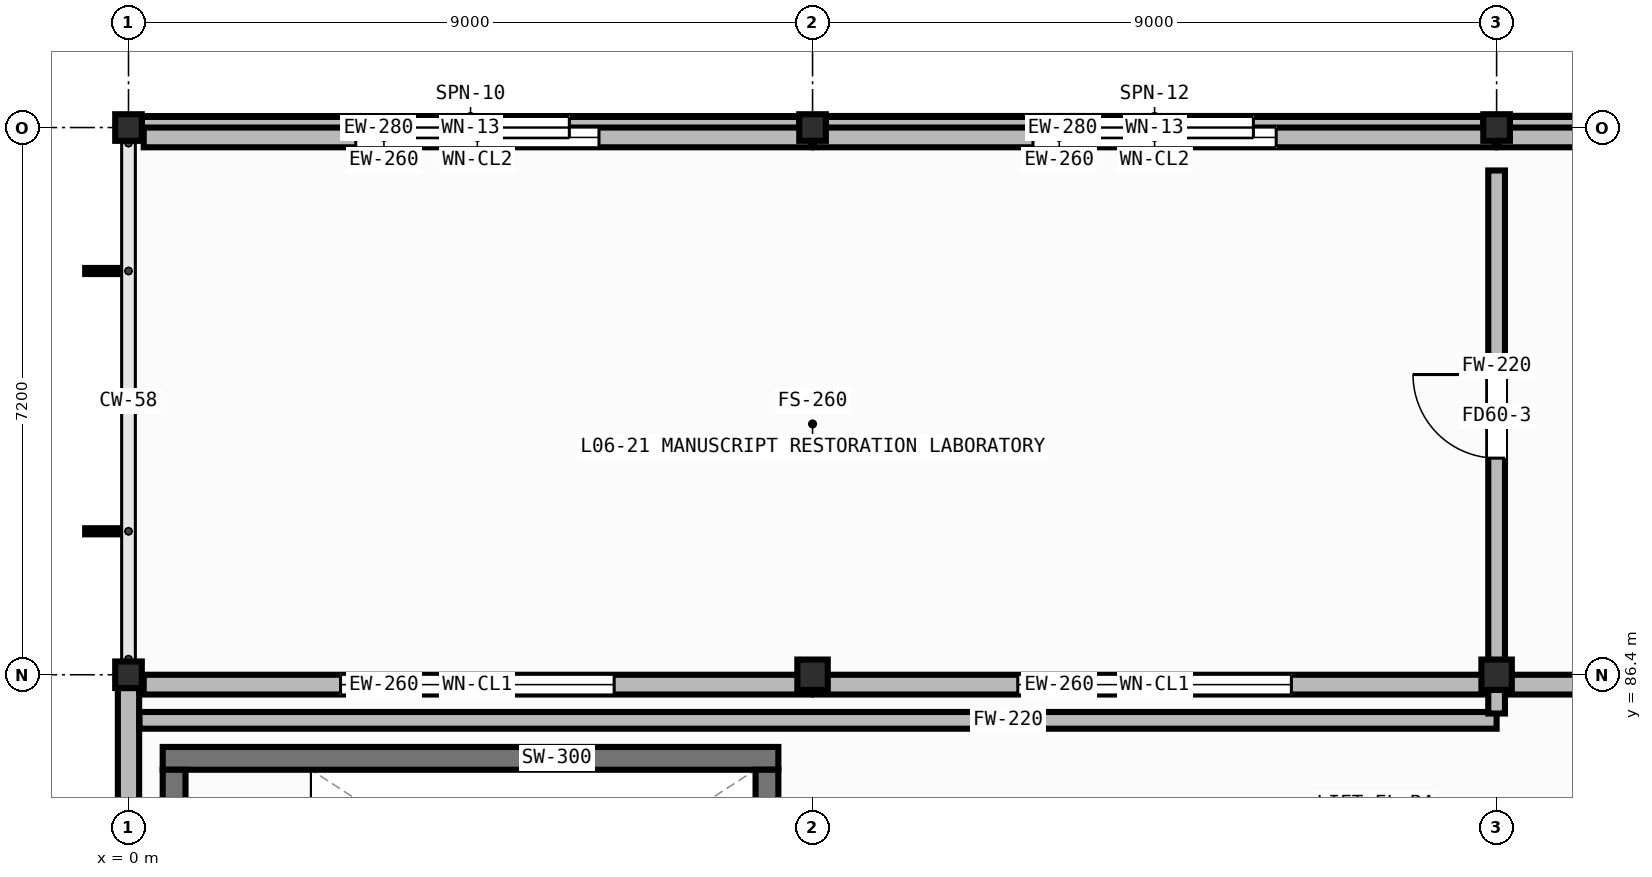
"""IFC4 building model, lengths in metres.
Left out: names, types, materials, properties, quantities, classifications, styles, units other than length and angle.
Written with IfcOpenShell. Run it as: python <this file> out.ifc"""

import sys

from ifc_helpers import new_model, si_unit, direction, frame, frame_2d, origin, origin_2d, place, context, subcontext, project, spatial, rectangle, hollow_rectangle, extrude, element, fill, save


model = new_model("IFC4")
c1 = context("Model", 3, precision=1e-05, world=origin(), true_north=direction((0.0, 1.0)))
c2 = subcontext(c1, "Body", "Model", "MODEL_VIEW")
j1 = project(units=[si_unit("LENGTHUNIT", "METRE"), si_unit("PLANEANGLEUNIT", "RADIAN")], contexts=[c1])
p1 = place(None, origin())
s1 = spatial("IfcSite", under=j1, at=p1, CompositionType="ELEMENT")
p2 = place(p1, origin())
s2 = spatial("IfcBuilding", under=s1, at=p2, CompositionType="ELEMENT")
p3 = place(p2, frame((0.0, 0.0, 20.6)))
s3 = spatial("IfcBuildingStorey", under=s2, at=p3, CompositionType="ELEMENT", Elevation=20.6)
for number, where, z_axis, x_axis in (
    (1, (0.0, 86.4, 0.0), (0.0, 0.0, 1.0), (1.0, 0.0, 0.0)),
    (2, (0.0, 93.6, 0.0), (0.0, 0.0, 1.0), (1.0, 0.0, 0.0)),
):
    element("IfcColumn", number, at=place(p3, frame(where, z_axis=z_axis, x_axis=x_axis)), inside=s3, PredefinedType="COLUMN", context=c2, shape_type="SweptSolid", body=[
        extrude(hollow_rectangle(XDim=0.35, YDim=0.35, WallThickness=0.012, at=origin_2d()), origin(), (0.0, 0.0, 1.0), 3.18),
    ])
p4 = place(p3, frame((9.0, 86.4, 0.0), z_axis=(0.0, 0.0, 1.0), x_axis=(1.0, 0.0, 0.0)))
e3 = element("IfcColumn", 3, at=p4, inside=s3, PredefinedType="COLUMN", context=c2, shape_type="SweptSolid", body=[
    extrude(hollow_rectangle(XDim=0.4, YDim=0.4, WallThickness=0.016, at=origin_2d()), origin(), (0.0, 0.0, 1.0), 3.18),
])
p5 = place(p3, frame((9.0, 93.6, 0.0), z_axis=(0.0, 0.0, 1.0), x_axis=(1.0, 0.0, 0.0)))
e4 = element("IfcColumn", 4, at=p5, inside=s3, PredefinedType="COLUMN", context=c2, shape_type="SweptSolid", body=[
    extrude(hollow_rectangle(XDim=0.35, YDim=0.35, WallThickness=0.012, at=origin_2d()), origin(), (0.0, 0.0, 1.0), 3.18),
])
p6 = place(p3, frame((18.0, 86.4, 0.0), z_axis=(0.0, 0.0, 1.0), x_axis=(1.0, 0.0, 0.0)))
e5 = element("IfcColumn", 5, at=p6, inside=s3, PredefinedType="COLUMN", context=c2, shape_type="SweptSolid", body=[
    extrude(hollow_rectangle(XDim=0.4, YDim=0.4, WallThickness=0.016, at=origin_2d()), origin(), (0.0, 0.0, 1.0), 3.18),
])
p7 = place(p3, frame((18.0, 93.6, 0.0), z_axis=(0.0, 0.0, 1.0), x_axis=(1.0, 0.0, 0.0)))
e6 = element("IfcColumn", 6, at=p7, inside=s3, PredefinedType="COLUMN", context=c2, shape_type="SweptSolid", body=[
    extrude(hollow_rectangle(XDim=0.35, YDim=0.35, WallThickness=0.012, at=origin_2d()), origin(), (0.0, 0.0, 1.0), 3.18),
])
p8 = place(p3, frame((8.825, 93.6, 0.0), z_axis=(0.0, 0.0, 1.0), x_axis=(-1.0, 0.0, 0.0)))
e7 = element("IfcWall", 7, at=p8, inside=s3, PredefinedType="STANDARD", context=c2, shape_type="SweptSolid", body=[
    extrude(rectangle(XDim=8.65, YDim=0.28, at=frame_2d((4.325, 0.0))), origin(), (0.0, 0.0, 1.0), 2.78),
])
p9 = place(p8, frame((3.025, 0.0, 0.85)))
e8 = element("IfcOpeningElement", 8, at=p9, cuts=e7, PredefinedType="OPENING", context=c2, shape_type="SweptSolid", body=[
    extrude(rectangle(XDim=2.6, YDim=1.6, at=frame_2d((1.3, 0.8))), frame((0.0, 0.152, 0.0), z_axis=(0.0, -1.0, 0.0), x_axis=(1.0, 0.0, 0.0)), (0.0, 0.0, 1.0), 0.304),
])
p10 = place(p3, frame((17.825, 93.6, 0.0), z_axis=(0.0, 0.0, 1.0), x_axis=(-1.0, 0.0, 0.0)))
e9 = element("IfcWall", 9, at=p10, inside=s3, PredefinedType="STANDARD", context=c2, shape_type="SweptSolid", body=[
    extrude(rectangle(XDim=8.65, YDim=0.28, at=frame_2d((4.325, 0.0))), origin(), (0.0, 0.0, 1.0), 2.78),
])
p11 = place(p10, frame((3.025, 0.0, 0.85)))
e10 = element("IfcOpeningElement", 10, at=p11, cuts=e9, PredefinedType="OPENING", context=c2, shape_type="SweptSolid", body=[
    extrude(rectangle(XDim=2.6, YDim=1.6, at=frame_2d((1.3, 0.8))), frame((0.0, 0.152, 0.0), z_axis=(0.0, -1.0, 0.0), x_axis=(1.0, 0.0, 0.0)), (0.0, 0.0, 1.0), 0.304),
])
p12 = place(p3, frame((26.825, 93.6, 0.0), z_axis=(0.0, 0.0, 1.0), x_axis=(-1.0, 0.0, 0.0)))
e11 = element("IfcWall", 11, at=p12, inside=s3, PredefinedType="STANDARD", context=c2, shape_type="SweptSolid", body=[
    extrude(rectangle(XDim=8.65, YDim=0.28, at=frame_2d((4.325, 0.0))), origin(), (0.0, 0.0, 1.0), 2.78),
])
p13 = place(p12, frame((3.025, 0.0, 0.85)))
e12 = element("IfcOpeningElement", 12, at=p13, cuts=e11, PredefinedType="OPENING", context=c2, shape_type="SweptSolid", body=[
    extrude(rectangle(XDim=2.6, YDim=1.6, at=frame_2d((1.3, 0.8))), frame((0.0, 0.152, 0.0), z_axis=(0.0, -1.0, 0.0), x_axis=(1.0, 0.0, 0.0)), (0.0, 0.0, 1.0), 0.304),
])
p14 = place(p3, frame((0.0, 79.375, 0.0), z_axis=(0.0, 0.0, 1.0), x_axis=(0.0, 1.0, 0.0)))
e13 = element("IfcWall", 13, at=p14, inside=s3, PredefinedType="STANDARD", context=c2, shape_type="SweptSolid", body=[
    extrude(rectangle(XDim=6.85, YDim=0.28, at=frame_2d((3.425, 0.0))), origin(), (0.0, 0.0, 1.0), 2.78),
])
p15 = place(p3, frame((8.98, 86.27, 3.4), z_axis=(0.0, 0.0, 1.0), x_axis=(-1.0, 0.0, 0.0)))
e14 = element("IfcWall", 14, at=p15, inside=s3, PredefinedType="STANDARD", context=c2, shape_type="SweptSolid", body=[
    extrude(rectangle(XDim=8.78, YDim=0.26, at=frame_2d((4.39, 0.0))), origin(), (0.0, 0.0, 1.0), 2.05),
])
p16 = place(p15, frame((2.59, 0.0, 0.38)))
e15 = element("IfcOpeningElement", 15, at=p16, cuts=e14, PredefinedType="OPENING", context=c2, shape_type="SweptSolid", body=[
    extrude(rectangle(XDim=3.6, YDim=1.2, at=frame_2d((1.8, 0.6))), frame((0.0, 0.142, 0.0), z_axis=(0.0, -1.0, 0.0), x_axis=(1.0, 0.0, 0.0)), (0.0, 0.0, 1.0), 0.284),
])
p17 = place(p3, frame((17.98, 86.27, 3.4), z_axis=(0.0, 0.0, 1.0), x_axis=(-1.0, 0.0, 0.0)))
e16 = element("IfcWall", 16, at=p17, inside=s3, PredefinedType="STANDARD", context=c2, shape_type="SweptSolid", body=[
    extrude(rectangle(XDim=8.96, YDim=0.26, at=frame_2d((4.48, 0.0))), origin(), (0.0, 0.0, 1.0), 2.05),
])
p18 = place(p17, frame((2.68, 0.0, 0.38)))
e17 = element("IfcOpeningElement", 17, at=p18, cuts=e16, PredefinedType="OPENING", context=c2, shape_type="SweptSolid", body=[
    extrude(rectangle(XDim=3.6, YDim=1.2, at=frame_2d((1.8, 0.6))), frame((0.0, 0.142, 0.0), z_axis=(0.0, -1.0, 0.0), x_axis=(1.0, 0.0, 0.0)), (0.0, 0.0, 1.0), 0.284),
])
p19 = place(p3, frame((26.98, 86.27, 3.4), z_axis=(0.0, 0.0, 1.0), x_axis=(-1.0, 0.0, 0.0)))
e18 = element("IfcWall", 18, at=p19, inside=s3, PredefinedType="STANDARD", context=c2, shape_type="SweptSolid", body=[
    extrude(rectangle(XDim=8.96, YDim=0.26, at=frame_2d((4.48, 0.0))), origin(), (0.0, 0.0, 1.0), 2.05),
])
p20 = place(p19, frame((2.68, 0.0, 0.38)))
e19 = element("IfcOpeningElement", 19, at=p20, cuts=e18, PredefinedType="OPENING", context=c2, shape_type="SweptSolid", body=[
    extrude(rectangle(XDim=3.6, YDim=1.2, at=frame_2d((1.8, 0.6))), frame((0.0, 0.142, 0.0), z_axis=(0.0, -1.0, 0.0), x_axis=(1.0, 0.0, 0.0)), (0.0, 0.0, 1.0), 0.284),
])
p21 = place(p3, frame((8.98, 93.47, 3.4), z_axis=(0.0, 0.0, 1.0), x_axis=(-1.0, 0.0, 0.0)))
e20 = element("IfcWall", 20, at=p21, inside=s3, PredefinedType="STANDARD", context=c2, shape_type="SweptSolid", body=[
    extrude(rectangle(XDim=8.78, YDim=0.26, at=frame_2d((4.39, 0.0))), origin(), (0.0, 0.0, 1.0), 2.05),
])
p22 = place(p21, frame((2.79, 0.0, 0.38)))
e21 = element("IfcOpeningElement", 21, at=p22, cuts=e20, PredefinedType="OPENING", context=c2, shape_type="SweptSolid", body=[
    extrude(rectangle(XDim=3.2, YDim=1.1, at=frame_2d((1.6, 0.55))), frame((0.0, 0.142, 0.0), z_axis=(0.0, -1.0, 0.0), x_axis=(1.0, 0.0, 0.0)), (0.0, 0.0, 1.0), 0.284),
])
p23 = place(p3, frame((17.98, 93.47, 3.4), z_axis=(0.0, 0.0, 1.0), x_axis=(-1.0, 0.0, 0.0)))
e22 = element("IfcWall", 22, at=p23, inside=s3, PredefinedType="STANDARD", context=c2, shape_type="SweptSolid", body=[
    extrude(rectangle(XDim=8.96, YDim=0.26, at=frame_2d((4.48, 0.0))), origin(), (0.0, 0.0, 1.0), 2.05),
])
p24 = place(p23, frame((2.88, 0.0, 0.38)))
e23 = element("IfcOpeningElement", 23, at=p24, cuts=e22, PredefinedType="OPENING", context=c2, shape_type="SweptSolid", body=[
    extrude(rectangle(XDim=3.2, YDim=1.1, at=frame_2d((1.6, 0.55))), frame((0.0, 0.142, 0.0), z_axis=(0.0, -1.0, 0.0), x_axis=(1.0, 0.0, 0.0)), (0.0, 0.0, 1.0), 0.284),
])
p25 = place(p3, frame((26.98, 93.47, 3.4), z_axis=(0.0, 0.0, 1.0), x_axis=(-1.0, 0.0, 0.0)))
e24 = element("IfcWall", 24, at=p25, inside=s3, PredefinedType="STANDARD", context=c2, shape_type="SweptSolid", body=[
    extrude(rectangle(XDim=8.96, YDim=0.26, at=frame_2d((4.48, 0.0))), origin(), (0.0, 0.0, 1.0), 2.05),
])
p26 = place(p25, frame((2.88, 0.0, 0.38)))
e25 = element("IfcOpeningElement", 25, at=p26, cuts=e24, PredefinedType="OPENING", context=c2, shape_type="SweptSolid", body=[
    extrude(rectangle(XDim=3.2, YDim=1.1, at=frame_2d((1.6, 0.55))), frame((0.0, 0.142, 0.0), z_axis=(0.0, -1.0, 0.0), x_axis=(1.0, 0.0, 0.0)), (0.0, 0.0, 1.0), 0.284),
])
p27 = place(p3, frame((0.45, 85.3, 0.0), z_axis=(0.0, 0.0, 1.0), x_axis=(1.0, 0.0, 0.0)))
e26 = element("IfcWall", 26, at=p27, inside=s3, PredefinedType="SHEAR", context=c2, shape_type="SweptSolid", body=[
    extrude(rectangle(XDim=8.1, YDim=0.3, at=frame_2d((4.05, 0.0))), origin(), (0.0, 0.0, 1.0), 3.18),
])
for number, where, z_axis, x_axis in (
    (27, (0.6, 81.35, 0.0), (0.0, 0.0, 1.0), (0.0, 1.0, 0.0)),
    (28, (8.4, 81.35, 0.0), (0.0, 0.0, 1.0), (0.0, 1.0, 0.0)),
):
    element("IfcWall", number, at=place(p3, frame(where, z_axis=z_axis, x_axis=x_axis)), inside=s3, PredefinedType="SHEAR", context=c2, shape_type="SweptSolid", body=[
        extrude(rectangle(XDim=3.8, YDim=0.3, at=frame_2d((1.9, 0.0))), origin(), (0.0, 0.0, 1.0), 3.18),
    ])
p28 = place(p3, frame((0.145, 85.8, 0.0), z_axis=(0.0, 0.0, 1.0), x_axis=(1.0, 0.0, 0.0)))
e29 = element("IfcWall", 29, at=p28, inside=s3, PredefinedType="PARTITIONING", context=c2, shape_type="SweptSolid", body=[
    extrude(rectangle(XDim=17.855, YDim=0.22, at=frame_2d((8.927, 0.0))), origin(), (0.0, 0.0, 1.0), 3.18),
])
p29 = place(p3, frame((18.0, 85.89, 0.0), z_axis=(0.0, 0.0, 1.0), x_axis=(0.0, 1.0, 0.0)))
e30 = element("IfcWall", 30, at=p29, inside=s3, PredefinedType="PARTITIONING", context=c2, shape_type="SweptSolid", body=[
    extrude(rectangle(XDim=7.145, YDim=0.22, at=frame_2d((3.573, 0.0))), origin(), (0.0, 0.0, 1.0), 2.46),
])
p30 = place(p29, frame((3.36, 0.0, 0.0)))
e31 = element("IfcOpeningElement", 31, at=p30, cuts=e30, PredefinedType="OPENING", context=c2, shape_type="SweptSolid", body=[
    extrude(rectangle(XDim=1.1, YDim=2.08, at=frame_2d((0.55, 1.04))), frame((0.0, 0.122, 0.0), z_axis=(0.0, -1.0, 0.0), x_axis=(1.0, 0.0, 0.0)), (0.0, 0.0, 1.0), 0.244),
])
p31 = place(p9, origin())
e32 = element("IfcWindow", 32, at=p31, inside=s3, PartitioningType="DOUBLE_PANEL_VERTICAL", PredefinedType="WINDOW", context=c2, shape_type="SweptSolid", body=[
    extrude(rectangle(XDim=2.6, YDim=1.6, at=frame_2d((1.3, 0.8))), frame((0.0, 0.03, 0.0), z_axis=(0.0, -1.0, 0.0), x_axis=(1.0, 0.0, 0.0)), (0.0, 0.0, 1.0), 0.06),
])
fill(e8, e32)
p32 = place(p11, origin())
e33 = element("IfcWindow", 33, at=p32, inside=s3, PartitioningType="DOUBLE_PANEL_VERTICAL", PredefinedType="WINDOW", context=c2, shape_type="SweptSolid", body=[
    extrude(rectangle(XDim=2.6, YDim=1.6, at=frame_2d((1.3, 0.8))), frame((0.0, 0.03, 0.0), z_axis=(0.0, -1.0, 0.0), x_axis=(1.0, 0.0, 0.0)), (0.0, 0.0, 1.0), 0.06),
])
fill(e10, e33)
p33 = place(p16, origin())
e34 = element("IfcWindow", 34, at=p33, inside=s3, PartitioningType="DOUBLE_PANEL_VERTICAL", PredefinedType="WINDOW", context=c2, shape_type="SweptSolid", body=[
    extrude(rectangle(XDim=3.6, YDim=1.2, at=frame_2d((1.8, 0.6))), frame((0.0, 0.03, 0.0), z_axis=(0.0, -1.0, 0.0), x_axis=(1.0, 0.0, 0.0)), (0.0, 0.0, 1.0), 0.06),
])
fill(e15, e34)
p34 = place(p18, origin())
e35 = element("IfcWindow", 35, at=p34, inside=s3, PartitioningType="DOUBLE_PANEL_VERTICAL", PredefinedType="WINDOW", context=c2, shape_type="SweptSolid", body=[
    extrude(rectangle(XDim=3.6, YDim=1.2, at=frame_2d((1.8, 0.6))), frame((0.0, 0.03, 0.0), z_axis=(0.0, -1.0, 0.0), x_axis=(1.0, 0.0, 0.0)), (0.0, 0.0, 1.0), 0.06),
])
fill(e17, e35)
p35 = place(p22, origin())
e36 = element("IfcWindow", 36, at=p35, inside=s3, PartitioningType="DOUBLE_PANEL_VERTICAL", PredefinedType="WINDOW", context=c2, shape_type="SweptSolid", body=[
    extrude(rectangle(XDim=3.2, YDim=1.1, at=frame_2d((1.6, 0.55))), frame((0.0, 0.03, 0.0), z_axis=(0.0, -1.0, 0.0), x_axis=(1.0, 0.0, 0.0)), (0.0, 0.0, 1.0), 0.06),
])
fill(e21, e36)
p36 = place(p24, origin())
e37 = element("IfcWindow", 37, at=p36, inside=s3, PartitioningType="DOUBLE_PANEL_VERTICAL", PredefinedType="WINDOW", context=c2, shape_type="SweptSolid", body=[
    extrude(rectangle(XDim=3.2, YDim=1.1, at=frame_2d((1.6, 0.55))), frame((0.0, 0.03, 0.0), z_axis=(0.0, -1.0, 0.0), x_axis=(1.0, 0.0, 0.0)), (0.0, 0.0, 1.0), 0.06),
])
fill(e23, e37)
p37 = place(p30, origin())
e38 = element("IfcDoor", 38, at=p37, inside=s3, OperationType="SINGLE_SWING_RIGHT", PredefinedType="DOOR", context=c2, shape_type="SweptSolid", body=[
    extrude(rectangle(XDim=1.1, YDim=2.08, at=frame_2d((0.55, 1.04))), frame((0.0, 0.025, 0.0), z_axis=(0.0, -1.0, 0.0), x_axis=(1.0, 0.0, 0.0)), (0.0, 0.0, 1.0), 0.05),
])
fill(e31, e38)
save(model, sys.argv[1])
